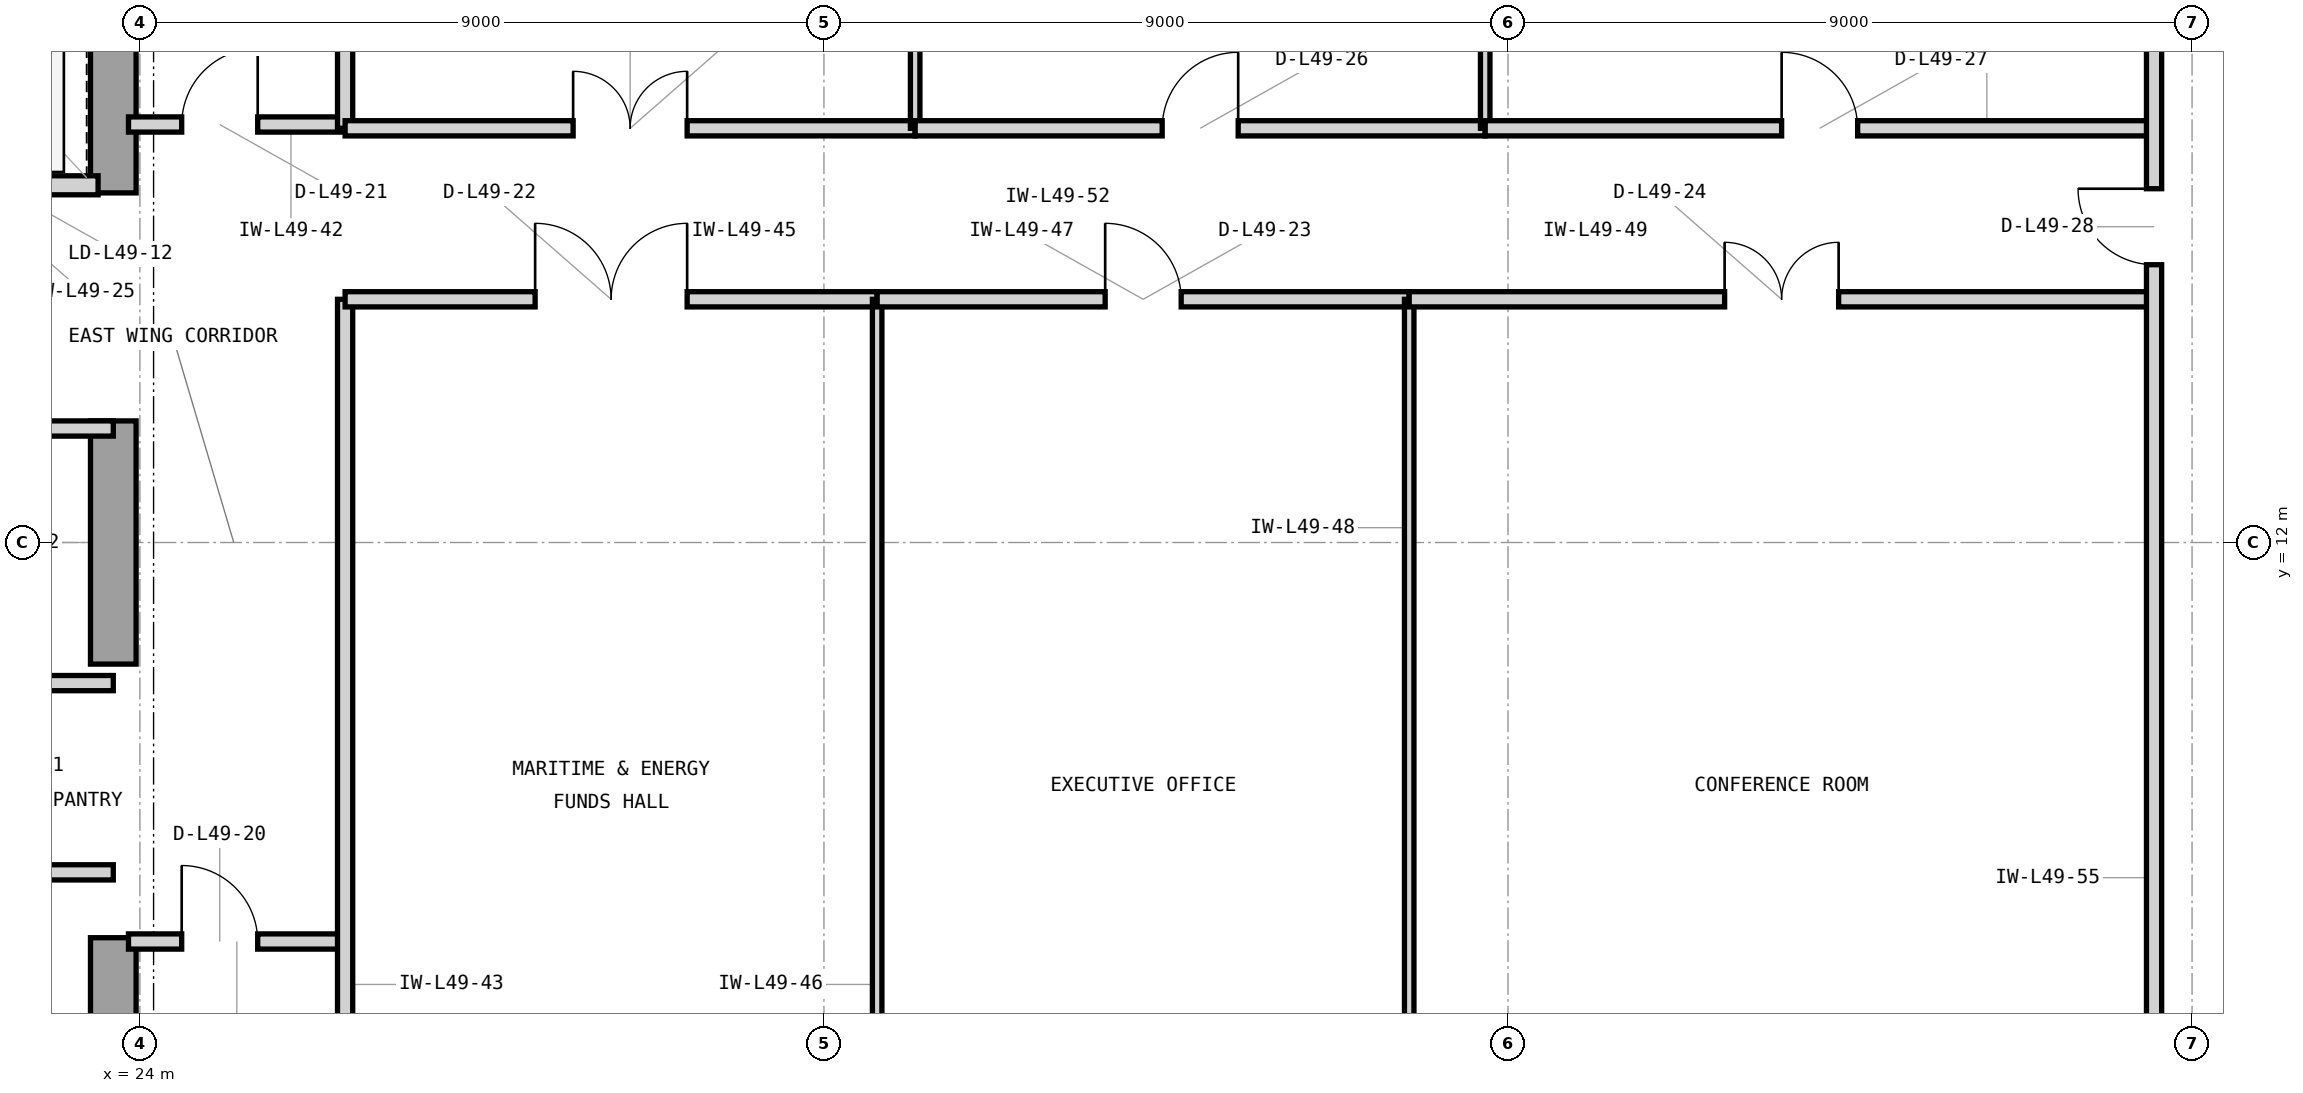
"""IFC4 building model, lengths in metres.
Left out: names, types, materials, properties, quantities, classifications, styles, units other than length and angle.
Written with IfcOpenShell. Run it as: python <this file> out.ifc"""

import sys

from ifc_helpers import new_model, si_unit, direction, frame, frame_2d, origin, place, context, subcontext, project, spatial, rectangle, extrude, element, fill, save


model = new_model("IFC4")
c1 = context("Model", 3, precision=1e-05, world=origin(), true_north=direction((0.0, 1.0)))
c2 = subcontext(c1, "Body", "Model", "MODEL_VIEW")
j1 = project(units=[si_unit("LENGTHUNIT", "METRE"), si_unit("PLANEANGLEUNIT", "RADIAN")], contexts=[c1])
p1 = place(None, origin())
s1 = spatial("IfcSite", under=j1, at=p1, CompositionType="ELEMENT")
p2 = place(p1, origin())
s2 = spatial("IfcBuilding", under=s1, at=p2, CompositionType="ELEMENT")
p3 = place(p2, frame((0.0, 0.0, 203.4)))
s3 = spatial("IfcBuildingStorey", under=s2, at=p3, CompositionType="ELEMENT", Elevation=203.4)
p4 = place(p3, frame((23.65, 3.65, 0.0), z_axis=(0.0, 0.0, 1.0), x_axis=(0.0, 1.0, 0.0)))
e1 = element("IfcWall", 1, at=p4, inside=s3, PredefinedType="SHEAR", context=c2, shape_type="SweptSolid", body=[
    extrude(rectangle(XDim=3.15, YDim=0.6, at=frame_2d((1.575, 0.0))), origin(), (0.0, 0.0, 1.0), 3.9),
])
p5 = place(p3, frame((23.65, 10.4, 0.0), z_axis=(0.0, 0.0, 1.0), x_axis=(0.0, 1.0, 0.0)))
e2 = element("IfcWall", 2, at=p5, inside=s3, PredefinedType="SHEAR", context=c2, shape_type="SweptSolid", body=[
    extrude(rectangle(XDim=3.2, YDim=0.6, at=frame_2d((1.6, 0.0))), origin(), (0.0, 0.0, 1.0), 3.9),
])
p6 = place(p3, frame((23.65, 16.6, 0.0), z_axis=(0.0, 0.0, 1.0), x_axis=(0.0, 1.0, 0.0)))
e3 = element("IfcWall", 3, at=p6, inside=s3, PredefinedType="SHEAR", context=c2, shape_type="SweptSolid", body=[
    extrude(rectangle(XDim=4.05, YDim=0.6, at=frame_2d((2.025, 0.0))), origin(), (0.0, 0.0, 1.0), 3.9),
])
p7 = place(p3, frame((21.05, 16.7, 0.0), z_axis=(0.0, 0.0, 1.0), x_axis=(1.0, 0.0, 0.0)))
e4 = element("IfcWall", 4, at=p7, inside=s3, PredefinedType="PARTITIONING", context=c2, shape_type="SweptSolid", body=[
    extrude(rectangle(XDim=2.4, YDim=0.25, at=frame_2d((1.2, 0.0))), origin(), (0.0, 0.0, 1.0), 3.283),
])
p8 = place(p7, frame((0.52, 0.0, 0.0)))
e5 = element("IfcOpeningElement", 5, at=p8, cuts=e4, PredefinedType="OPENING", context=c2, shape_type="SweptSolid", body=[
    extrude(rectangle(XDim=1.15, YDim=2.25, at=frame_2d((0.575, 1.125))), frame((0.0, 0.135, 0.0), z_axis=(0.0, -1.0, 0.0), x_axis=(1.0, 0.0, 0.0)), (0.0, 0.0, 1.0), 0.27),
])
p9 = place(p3, frame((20.8, 7.66, 0.0), z_axis=(0.0, 0.0, 1.0), x_axis=(1.0, 0.0, 0.0)))
e6 = element("IfcWall", 6, at=p9, inside=s3, PredefinedType="PARTITIONING", context=c2, shape_type="SweptSolid", body=[
    extrude(rectangle(XDim=2.85, YDim=0.2, at=frame_2d((1.425, 0.0))), origin(), (0.0, 0.0, 1.0), 3.69),
])
p10 = place(p9, frame((0.95, 0.0, 0.0)))
e7 = element("IfcOpeningElement", 7, at=p10, cuts=e6, PredefinedType="OPENING", context=c2, shape_type="SweptSolid", body=[
    extrude(rectangle(XDim=0.95, YDim=2.1, at=frame_2d((0.475, 1.05))), frame((0.0, 0.11, 0.0), z_axis=(0.0, -1.0, 0.0), x_axis=(1.0, 0.0, 0.0)), (0.0, 0.0, 1.0), 0.22),
])
p11 = place(p3, frame((14.825, 10.15, 0.0), z_axis=(0.0, 0.0, 1.0), x_axis=(1.0, 0.0, 0.0)))
e8 = element("IfcWall", 8, at=p11, inside=s3, PredefinedType="PARTITIONING", context=c2, shape_type="SweptSolid", body=[
    extrude(rectangle(XDim=8.825, YDim=0.2, at=frame_2d((4.413, 0.0))), origin(), (0.0, 0.0, 1.0), 3.69),
])
p12 = place(p3, frame((18.5, 13.5, 0.0), z_axis=(0.0, 0.0, 1.0), x_axis=(1.0, 0.0, 0.0)))
e9 = element("IfcWall", 9, at=p12, inside=s3, PredefinedType="PARTITIONING", context=c2, shape_type="SweptSolid", body=[
    extrude(rectangle(XDim=5.15, YDim=0.2, at=frame_2d((2.575, 0.0))), origin(), (0.0, 0.0, 1.0), 3.283),
])
p13 = place(p12, frame((2.1, 0.0, 0.0)))
e10 = element("IfcOpeningElement", 10, at=p13, cuts=e9, PredefinedType="OPENING", context=c2, shape_type="SweptSolid", body=[
    extrude(rectangle(XDim=0.95, YDim=2.1, at=frame_2d((0.475, 1.05))), frame((0.0, 0.11, 0.0), z_axis=(0.0, -1.0, 0.0), x_axis=(1.0, 0.0, 0.0)), (0.0, 0.0, 1.0), 0.22),
])
p14 = place(p3, frame((23.85, 6.75, 0.0), z_axis=(0.0, 0.0, 1.0), x_axis=(1.0, 0.0, 0.0)))
e11 = element("IfcWall", 11, at=p14, inside=s3, PredefinedType="PARTITIONING", context=c2, shape_type="SweptSolid", body=[
    extrude(rectangle(XDim=2.85, YDim=0.2, at=frame_2d((1.425, 0.0))), origin(), (0.0, 0.0, 1.0), 3.69),
])
p15 = place(p14, frame((0.7, 0.0, 0.0)))
e12 = element("IfcOpeningElement", 12, at=p15, cuts=e11, PredefinedType="OPENING", context=c2, shape_type="SweptSolid", body=[
    extrude(rectangle(XDim=1.0, YDim=2.15, at=frame_2d((0.5, 1.075))), frame((0.0, 0.11, 0.0), z_axis=(0.0, -1.0, 0.0), x_axis=(1.0, 0.0, 0.0)), (0.0, 0.0, 1.0), 0.22),
])
p16 = place(p3, frame((23.85, 17.5, 0.0), z_axis=(0.0, 0.0, 1.0), x_axis=(1.0, 0.0, 0.0)))
e13 = element("IfcWall", 13, at=p16, inside=s3, PredefinedType="PARTITIONING", context=c2, shape_type="SweptSolid", body=[
    extrude(rectangle(XDim=2.85, YDim=0.2, at=frame_2d((1.425, 0.0))), origin(), (0.0, 0.0, 1.0), 3.69),
])
p17 = place(p16, frame((0.7, 0.0, 0.0)))
e14 = element("IfcOpeningElement", 14, at=p17, cuts=e13, PredefinedType="OPENING", context=c2, shape_type="SweptSolid", body=[
    extrude(rectangle(XDim=1.0, YDim=2.15, at=frame_2d((0.5, 1.075))), frame((0.0, 0.11, 0.0), z_axis=(0.0, -1.0, 0.0), x_axis=(1.0, 0.0, 0.0)), (0.0, 0.0, 1.0), 0.22),
])
p18 = place(p3, frame((26.7, 3.18, 0.0), z_axis=(0.0, 0.0, 1.0), x_axis=(0.0, 1.0, 0.0)))
e15 = element("IfcWall", 15, at=p18, inside=s3, PredefinedType="PARTITIONING", context=c2, shape_type="SweptSolid", body=[
    extrude(rectangle(XDim=12.02, YDim=0.2, at=frame_2d((6.01, 0.0))), origin(), (0.0, 0.0, 1.0), 3.69),
])
p19 = place(p3, frame((26.7, 17.45, 0.0), z_axis=(0.0, 0.0, 1.0), x_axis=(0.0, 1.0, 0.0)))
e16 = element("IfcWall", 16, at=p19, inside=s3, PredefinedType="PARTITIONING", context=c2, shape_type="SweptSolid", body=[
    extrude(rectangle(XDim=3.37, YDim=0.2, at=frame_2d((1.685, 0.0))), origin(), (0.0, 0.0, 1.0), 3.69),
])
p20 = place(p3, frame((26.7, 15.2, 0.0), z_axis=(0.0, 0.0, 1.0), x_axis=(1.0, 0.0, 0.0)))
e17 = element("IfcWall", 17, at=p20, inside=s3, PredefinedType="PARTITIONING", context=c2, shape_type="SweptSolid", body=[
    extrude(rectangle(XDim=7.0, YDim=0.2, at=frame_2d((3.5, 0.0))), origin(), (0.0, 0.0, 1.0), 3.69),
])
p21 = place(p20, frame((2.5, 0.0, 0.0)))
e18 = element("IfcOpeningElement", 18, at=p21, cuts=e17, PredefinedType="OPENING", context=c2, shape_type="SweptSolid", body=[
    extrude(rectangle(XDim=2.0, YDim=2.5, at=frame_2d((1.0, 1.25))), frame((0.0, 0.11, 0.0), z_axis=(0.0, -1.0, 0.0), x_axis=(1.0, 0.0, 0.0)), (0.0, 0.0, 1.0), 0.22),
])
p22 = place(p3, frame((33.7, 3.18, 0.0), z_axis=(0.0, 0.0, 1.0), x_axis=(0.0, 1.0, 0.0)))
e19 = element("IfcWall", 19, at=p22, inside=s3, PredefinedType="PARTITIONING", context=c2, shape_type="SweptSolid", body=[
    extrude(rectangle(XDim=12.02, YDim=0.125, at=frame_2d((6.01, 0.0))), origin(), (0.0, 0.0, 1.0), 3.69),
])
p23 = place(p3, frame((33.7, 15.2, 0.0), z_axis=(0.0, 0.0, 1.0), x_axis=(1.0, 0.0, 0.0)))
e20 = element("IfcWall", 20, at=p23, inside=s3, PredefinedType="PARTITIONING", context=c2, shape_type="SweptSolid", body=[
    extrude(rectangle(XDim=7.0, YDim=0.2, at=frame_2d((3.5, 0.0))), origin(), (0.0, 0.0, 1.0), 3.69),
])
p24 = place(p23, frame((3.0, 0.0, 0.0)))
e21 = element("IfcOpeningElement", 21, at=p24, cuts=e20, PredefinedType="OPENING", context=c2, shape_type="SweptSolid", body=[
    extrude(rectangle(XDim=1.0, YDim=2.15, at=frame_2d((0.5, 1.075))), frame((0.0, 0.11, 0.0), z_axis=(0.0, -1.0, 0.0), x_axis=(1.0, 0.0, 0.0)), (0.0, 0.0, 1.0), 0.22),
])
p25 = place(p3, frame((40.7, 3.18, 0.0), z_axis=(0.0, 0.0, 1.0), x_axis=(0.0, 1.0, 0.0)))
e22 = element("IfcWall", 22, at=p25, inside=s3, PredefinedType="PARTITIONING", context=c2, shape_type="SweptSolid", body=[
    extrude(rectangle(XDim=12.02, YDim=0.125, at=frame_2d((6.01, 0.0))), origin(), (0.0, 0.0, 1.0), 3.69),
])
p26 = place(p3, frame((40.7, 15.2, 0.0), z_axis=(0.0, 0.0, 1.0), x_axis=(1.0, 0.0, 0.0)))
e23 = element("IfcWall", 23, at=p26, inside=s3, PredefinedType="PARTITIONING", context=c2, shape_type="SweptSolid", body=[
    extrude(rectangle(XDim=9.8, YDim=0.2, at=frame_2d((4.9, 0.0))), origin(), (0.0, 0.0, 1.0), 3.69),
])
p27 = place(p26, frame((4.15, 0.0, 0.0)))
e24 = element("IfcOpeningElement", 24, at=p27, cuts=e23, PredefinedType="OPENING", context=c2, shape_type="SweptSolid", body=[
    extrude(rectangle(XDim=1.5, YDim=2.3, at=frame_2d((0.75, 1.15))), frame((0.0, 0.11, 0.0), z_axis=(0.0, -1.0, 0.0), x_axis=(1.0, 0.0, 0.0)), (0.0, 0.0, 1.0), 0.22),
])
p28 = place(p3, frame((26.7, 17.45, 0.0), z_axis=(0.0, 0.0, 1.0), x_axis=(1.0, 0.0, 0.0)))
e25 = element("IfcWall", 25, at=p28, inside=s3, PredefinedType="PARTITIONING", context=c2, shape_type="SweptSolid", body=[
    extrude(rectangle(XDim=7.5, YDim=0.2, at=frame_2d((3.75, 0.0))), origin(), (0.0, 0.0, 1.0), 3.69),
])
p29 = place(p28, frame((3.0, 0.0, 0.0)))
e26 = element("IfcOpeningElement", 26, at=p29, cuts=e25, PredefinedType="OPENING", context=c2, shape_type="SweptSolid", body=[
    extrude(rectangle(XDim=1.5, YDim=2.3, at=frame_2d((0.75, 1.15))), frame((0.0, 0.11, 0.0), z_axis=(0.0, -1.0, 0.0), x_axis=(1.0, 0.0, 0.0)), (0.0, 0.0, 1.0), 0.22),
])
p30 = place(p3, frame((34.2, 17.45, 0.0), z_axis=(0.0, 0.0, 1.0), x_axis=(0.0, 1.0, 0.0)))
e27 = element("IfcWall", 27, at=p30, inside=s3, PredefinedType="PARTITIONING", context=c2, shape_type="SweptSolid", body=[
    extrude(rectangle(XDim=3.37, YDim=0.125, at=frame_2d((1.685, 0.0))), origin(), (0.0, 0.0, 1.0), 3.69),
])
p31 = place(p3, frame((34.2, 17.45, 0.0), z_axis=(0.0, 0.0, 1.0), x_axis=(1.0, 0.0, 0.0)))
e28 = element("IfcWall", 28, at=p31, inside=s3, PredefinedType="PARTITIONING", context=c2, shape_type="SweptSolid", body=[
    extrude(rectangle(XDim=7.5, YDim=0.2, at=frame_2d((3.75, 0.0))), origin(), (0.0, 0.0, 1.0), 3.69),
])
p32 = place(p31, frame((3.25, 0.0, 0.0)))
e29 = element("IfcOpeningElement", 29, at=p32, cuts=e28, PredefinedType="OPENING", context=c2, shape_type="SweptSolid", body=[
    extrude(rectangle(XDim=1.0, YDim=2.15, at=frame_2d((0.5, 1.075))), frame((0.0, 0.11, 0.0), z_axis=(0.0, -1.0, 0.0), x_axis=(1.0, 0.0, 0.0)), (0.0, 0.0, 1.0), 0.22),
])
p33 = place(p3, frame((41.7, 17.45, 0.0), z_axis=(0.0, 0.0, 1.0), x_axis=(0.0, 1.0, 0.0)))
e30 = element("IfcWall", 30, at=p33, inside=s3, PredefinedType="PARTITIONING", context=c2, shape_type="SweptSolid", body=[
    extrude(rectangle(XDim=3.37, YDim=0.125, at=frame_2d((1.685, 0.0))), origin(), (0.0, 0.0, 1.0), 3.69),
])
p34 = place(p3, frame((41.7, 17.45, 0.0), z_axis=(0.0, 0.0, 1.0), x_axis=(1.0, 0.0, 0.0)))
e31 = element("IfcWall", 31, at=p34, inside=s3, PredefinedType="PARTITIONING", context=c2, shape_type="SweptSolid", body=[
    extrude(rectangle(XDim=8.8, YDim=0.2, at=frame_2d((4.4, 0.0))), origin(), (0.0, 0.0, 1.0), 3.69),
])
p35 = place(p34, frame((3.9, 0.0, 0.0)))
e32 = element("IfcOpeningElement", 32, at=p35, cuts=e31, PredefinedType="OPENING", context=c2, shape_type="SweptSolid", body=[
    extrude(rectangle(XDim=1.0, YDim=2.15, at=frame_2d((0.5, 1.075))), frame((0.0, 0.11, 0.0), z_axis=(0.0, -1.0, 0.0), x_axis=(1.0, 0.0, 0.0)), (0.0, 0.0, 1.0), 0.22),
])
p36 = place(p3, frame((50.5, 3.18, 0.0), z_axis=(0.0, 0.0, 1.0), x_axis=(0.0, 1.0, 0.0)))
e33 = element("IfcWall", 33, at=p36, inside=s3, PredefinedType="PARTITIONING", context=c2, shape_type="SweptSolid", body=[
    extrude(rectangle(XDim=17.64, YDim=0.2, at=frame_2d((8.82, 0.0))), origin(), (0.0, 0.0, 1.0), 3.69),
])
p37 = place(p36, frame((12.475, 0.0, 0.0)))
e34 = element("IfcOpeningElement", 34, at=p37, cuts=e33, PredefinedType="OPENING", context=c2, shape_type="SweptSolid", body=[
    extrude(rectangle(XDim=1.0, YDim=2.15, at=frame_2d((0.5, 1.075))), frame((0.0, 0.11, 0.0), z_axis=(0.0, -1.0, 0.0), x_axis=(1.0, 0.0, 0.0)), (0.0, 0.0, 1.0), 0.22),
])
p38 = place(p15, origin())
e35 = element("IfcDoor", 35, at=p38, inside=s3, OperationType="SINGLE_SWING_LEFT", PredefinedType="DOOR", context=c2, shape_type="SweptSolid", body=[
    extrude(rectangle(XDim=1.0, YDim=2.15, at=frame_2d((0.5, 1.075))), frame((0.0, 0.025, 0.0), z_axis=(0.0, -1.0, 0.0), x_axis=(1.0, 0.0, 0.0)), (0.0, 0.0, 1.0), 0.05),
])
fill(e12, e35)
p39 = place(p17, origin())
e36 = element("IfcDoor", 36, at=p39, inside=s3, OperationType="SINGLE_SWING_RIGHT", PredefinedType="DOOR", context=c2, shape_type="SweptSolid", body=[
    extrude(rectangle(XDim=1.0, YDim=2.15, at=frame_2d((0.5, 1.075))), frame((0.0, 0.025, 0.0), z_axis=(0.0, -1.0, 0.0), x_axis=(1.0, 0.0, 0.0)), (0.0, 0.0, 1.0), 0.05),
])
fill(e14, e36)
p40 = place(p21, origin())
e37 = element("IfcDoor", 37, at=p40, inside=s3, OperationType="DOUBLE_DOOR_SINGLE_SWING", PredefinedType="DOOR", context=c2, shape_type="SweptSolid", body=[
    extrude(rectangle(XDim=2.0, YDim=2.5, at=frame_2d((1.0, 1.25))), frame((0.0, 0.025, 0.0), z_axis=(0.0, -1.0, 0.0), x_axis=(1.0, 0.0, 0.0)), (0.0, 0.0, 1.0), 0.05),
])
fill(e18, e37)
p41 = place(p24, origin())
e38 = element("IfcDoor", 38, at=p41, inside=s3, OperationType="SINGLE_SWING_LEFT", PredefinedType="DOOR", context=c2, shape_type="SweptSolid", body=[
    extrude(rectangle(XDim=1.0, YDim=2.15, at=frame_2d((0.5, 1.075))), frame((0.0, 0.025, 0.0), z_axis=(0.0, -1.0, 0.0), x_axis=(1.0, 0.0, 0.0)), (0.0, 0.0, 1.0), 0.05),
])
fill(e21, e38)
p42 = place(p27, origin())
e39 = element("IfcDoor", 39, at=p42, inside=s3, OperationType="DOUBLE_DOOR_SINGLE_SWING", PredefinedType="DOOR", context=c2, shape_type="SweptSolid", body=[
    extrude(rectangle(XDim=1.5, YDim=2.3, at=frame_2d((0.75, 1.15))), frame((0.0, 0.025, 0.0), z_axis=(0.0, -1.0, 0.0), x_axis=(1.0, 0.0, 0.0)), (0.0, 0.0, 1.0), 0.05),
])
fill(e24, e39)
p43 = place(p29, origin())
e40 = element("IfcDoor", 40, at=p43, inside=s3, OperationType="DOUBLE_DOOR_SINGLE_SWING", PredefinedType="DOOR", context=c2, shape_type="SweptSolid", body=[
    extrude(rectangle(XDim=1.5, YDim=2.3, at=frame_2d((0.75, 1.15))), frame((0.0, 0.025, 0.0), z_axis=(0.0, -1.0, 0.0), x_axis=(1.0, 0.0, 0.0)), (0.0, 0.0, 1.0), 0.05),
])
fill(e26, e40)
p44 = place(p32, origin())
e41 = element("IfcDoor", 41, at=p44, inside=s3, OperationType="SINGLE_SWING_RIGHT", PredefinedType="DOOR", context=c2, shape_type="SweptSolid", body=[
    extrude(rectangle(XDim=1.0, YDim=2.15, at=frame_2d((0.5, 1.075))), frame((0.0, 0.025, 0.0), z_axis=(0.0, -1.0, 0.0), x_axis=(1.0, 0.0, 0.0)), (0.0, 0.0, 1.0), 0.05),
])
fill(e29, e41)
p45 = place(p35, origin())
e42 = element("IfcDoor", 42, at=p45, inside=s3, OperationType="SINGLE_SWING_LEFT", PredefinedType="DOOR", context=c2, shape_type="SweptSolid", body=[
    extrude(rectangle(XDim=1.0, YDim=2.15, at=frame_2d((0.5, 1.075))), frame((0.0, 0.025, 0.0), z_axis=(0.0, -1.0, 0.0), x_axis=(1.0, 0.0, 0.0)), (0.0, 0.0, 1.0), 0.05),
])
fill(e32, e42)
p46 = place(p37, origin())
e43 = element("IfcDoor", 43, at=p46, inside=s3, OperationType="SINGLE_SWING_RIGHT", PredefinedType="DOOR", context=c2, shape_type="SweptSolid", body=[
    extrude(rectangle(XDim=1.0, YDim=2.15, at=frame_2d((0.5, 1.075))), frame((0.0, 0.025, 0.0), z_axis=(0.0, -1.0, 0.0), x_axis=(1.0, 0.0, 0.0)), (0.0, 0.0, 1.0), 0.05),
])
fill(e34, e43)
save(model, sys.argv[1])
